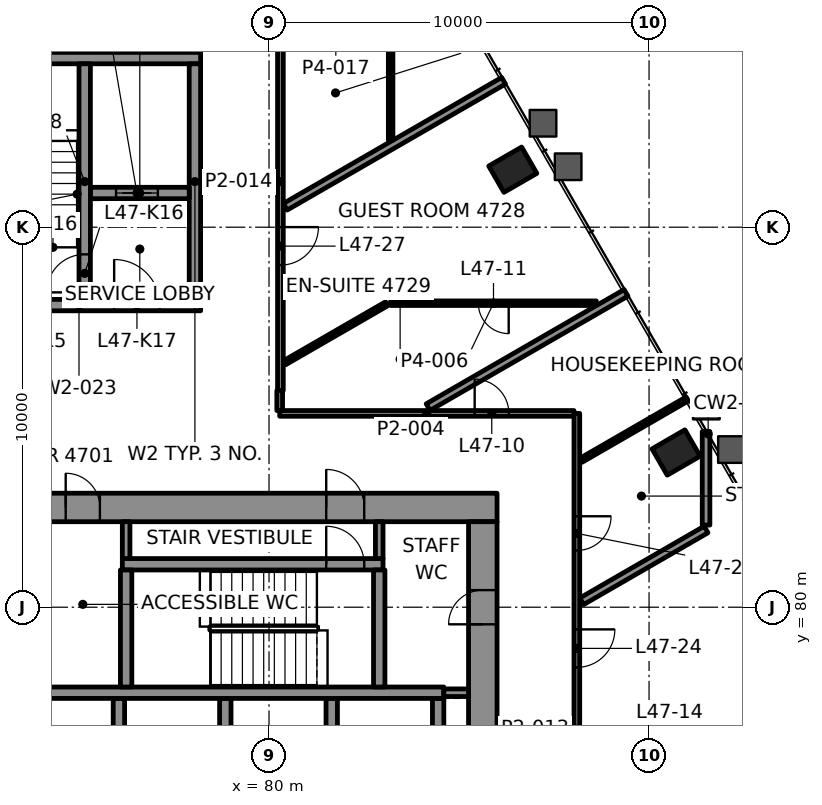
"""IFC4 building model, lengths in metres.
Left out: names, types, materials, properties, quantities, classifications, styles, units other than length and angle.
Written with IfcOpenShell. Run it as: python <this file> out.ifc"""

import sys

from ifc_helpers import new_model, si_unit, direction, frame, frame_2d, origin, origin_2d, place, context, subcontext, project, spatial, rectangle, hollow_rectangle, extrude, element, fill, save


model = new_model("IFC4")
c1 = context("Model", 3, precision=1e-05, world=origin(), true_north=direction((0.0, 1.0)))
c2 = subcontext(c1, "Body", "Model", "MODEL_VIEW")
j1 = project(units=[si_unit("LENGTHUNIT", "METRE"), si_unit("PLANEANGLEUNIT", "RADIAN")], contexts=[c1])
p1 = place(None, origin())
s1 = spatial("IfcSite", under=j1, at=p1, CompositionType="ELEMENT")
p2 = place(p1, origin())
s2 = spatial("IfcBuilding", under=s1, at=p2, CompositionType="ELEMENT")
p3 = place(p2, frame((0.0, 0.0, 202.6)))
s3 = spatial("IfcBuildingStorey", under=s2, at=p3, CompositionType="ELEMENT", Elevation=202.6)
for number, where, z_axis, x_axis in (
    (1, (90.711, 84.071, -0.0), (0.0, 0.0, 1.0), (-0.5, 0.866, 0.0)),
    (2, (86.414, 91.513, -0.0), (0.0, 0.0, 1.0), (-0.5, 0.866, 0.0)),
):
    element("IfcColumn", number, at=place(p3, frame(where, z_axis=z_axis, x_axis=x_axis)), inside=s3, PredefinedType="COLUMN", context=c2, shape_type="SweptSolid", body=[
        extrude(hollow_rectangle(XDim=0.8, YDim=1.0, WallThickness=0.05, at=origin_2d()), origin(), (0.0, 0.0, 1.0), 3.9),
    ])
p4 = place(p3, frame((64.0, 82.625, 0.0), z_axis=(0.0, 0.0, 1.0), x_axis=(1.0, 0.0, 0.0)))
e3 = element("IfcWall", 3, at=p4, inside=s3, PredefinedType="SHEAR", context=c2, shape_type="SweptSolid", body=[
    extrude(rectangle(XDim=22.0, YDim=0.75, at=frame_2d((11.0, 0.0))), origin(), (0.0, 0.0, 1.0), 3.7),
])
p5 = place(p4, frame((3.695, 0.0, 0.0)))
e4 = element("IfcOpeningElement", 4, at=p5, cuts=e3, PredefinedType="OPENING", context=c2, shape_type="SweptSolid", body=[
    extrude(rectangle(XDim=1.0, YDim=2.1, at=frame_2d((0.5, 1.05))), frame((0.0, 0.385, 0.0), z_axis=(0.0, -1.0, 0.0), x_axis=(1.0, 0.0, 0.0)), (0.0, 0.0, 1.0), 0.77),
])
p6 = place(p4, frame((17.505, 0.0, 0.0)))
e5 = element("IfcOpeningElement", 5, at=p6, cuts=e3, PredefinedType="OPENING", context=c2, shape_type="SweptSolid", body=[
    extrude(rectangle(XDim=1.0, YDim=2.1, at=frame_2d((0.5, 1.05))), frame((0.0, 0.385, 0.0), z_axis=(0.0, -1.0, 0.0), x_axis=(1.0, 0.0, 0.0)), (0.0, 0.0, 1.0), 0.77),
])
p7 = place(p4, frame((10.65, 0.0, 0.0)))
e6 = element("IfcOpeningElement", 6, at=p7, cuts=e3, PredefinedType="OPENING", context=c2, shape_type="SweptSolid", body=[
    extrude(rectangle(XDim=0.9, YDim=2.1, at=frame_2d((0.45, 1.05))), frame((0.0, 0.385, 0.0), z_axis=(0.0, -1.0, 0.0), x_axis=(1.0, 0.0, 0.0)), (0.0, 0.0, 1.0), 0.77),
])
p8 = place(p3, frame((85.625, 67.75, 0.0), z_axis=(0.0, 0.0, 1.0), x_axis=(0.0, 1.0, 0.0)))
e7 = element("IfcWall", 7, at=p8, inside=s3, PredefinedType="SHEAR", context=c2, shape_type="SweptSolid", body=[
    extrude(rectangle(XDim=14.5, YDim=0.75, at=frame_2d((7.25, 0.0))), origin(), (0.0, 0.0, 1.0), 3.7),
])
p9 = place(p8, frame((4.65, 0.0, 0.0)))
e8 = element("IfcOpeningElement", 8, at=p9, cuts=e7, PredefinedType="OPENING", context=c2, shape_type="SweptSolid", body=[
    extrude(rectangle(XDim=1.8, YDim=2.1, at=frame_2d((0.9, 1.05))), frame((0.0, 0.385, 0.0), z_axis=(0.0, -1.0, 0.0), x_axis=(1.0, 0.0, 0.0)), (0.0, 0.0, 1.0), 0.77),
])
p10 = place(p8, frame((11.8, 0.0, 0.0)))
e9 = element("IfcOpeningElement", 9, at=p10, cuts=e7, PredefinedType="OPENING", context=c2, shape_type="SweptSolid", body=[
    extrude(rectangle(XDim=0.9, YDim=2.1, at=frame_2d((0.45, 1.05))), frame((0.0, 0.385, 0.0), z_axis=(0.0, -1.0, 0.0), x_axis=(1.0, 0.0, 0.0)), (0.0, 0.0, 1.0), 0.77),
])
for number, where, z_axis, x_axis in (
    (10, (76.05, 75.0, 0.0), (0.0, 0.0, 1.0), (0.0, 1.0, 0.0)),
    (11, (78.85, 75.0, 0.0), (0.0, 0.0, 1.0), (0.0, 1.0, 0.0)),
    (12, (81.65, 75.0, 0.0), (0.0, 0.0, 1.0), (0.0, 1.0, 0.0)),
    (13, (84.45, 75.0, 0.0), (0.0, 0.0, 1.0), (0.0, 1.0, 0.0)),
):
    element("IfcWall", number, at=place(p3, frame(where, z_axis=z_axis, x_axis=x_axis)), inside=s3, PredefinedType="SHEAR", context=c2, shape_type="SweptSolid", body=[
        extrude(rectangle(XDim=2.6, YDim=0.3, at=frame_2d((1.3, 0.0))), origin(), (0.0, 0.0, 1.0), 3.7),
    ])
p11 = place(p3, frame((67.15, 77.75, 0.0), z_axis=(0.0, 0.0, 1.0), x_axis=(1.0, 0.0, 0.0)))
e14 = element("IfcWall", 14, at=p11, inside=s3, PredefinedType="SHEAR", context=c2, shape_type="SweptSolid", body=[
    extrude(rectangle(XDim=17.45, YDim=0.3, at=frame_2d((8.725, 0.0))), origin(), (0.0, 0.0, 1.0), 3.7),
])
p12 = place(p11, frame((0.545, 0.0, 0.0)))
e15 = element("IfcOpeningElement", 15, at=p12, cuts=e14, PredefinedType="OPENING", context=c2, shape_type="SweptSolid", body=[
    extrude(rectangle(XDim=1.0, YDim=2.1, at=frame_2d((0.5, 1.05))), frame((0.0, 0.16, 0.0), z_axis=(0.0, -1.0, 0.0), x_axis=(1.0, 0.0, 0.0)), (0.0, 0.0, 1.0), 0.32),
])
p13 = place(p3, frame((76.14, 81.13, 0.0), z_axis=(0.0, 0.0, 1.0), x_axis=(1.0, 0.0, 0.0)))
e16 = element("IfcWall", 16, at=p13, inside=s3, PredefinedType="SHEAR", context=c2, shape_type="SweptSolid", body=[
    extrude(rectangle(XDim=6.86, YDim=0.3, at=frame_2d((3.43, 0.0))), origin(), (0.0, 0.0, 1.0), 3.7),
])
p14 = place(p13, frame((5.365, 0.0, 0.0)))
e17 = element("IfcOpeningElement", 17, at=p14, cuts=e16, PredefinedType="OPENING", context=c2, shape_type="SweptSolid", body=[
    extrude(rectangle(XDim=1.0, YDim=2.1, at=frame_2d((0.5, 1.05))), frame((0.0, 0.16, 0.0), z_axis=(0.0, -1.0, 0.0), x_axis=(1.0, 0.0, 0.0)), (0.0, 0.0, 1.0), 0.32),
])
for number, where, z_axis, x_axis in (
    (18, (76.24, 77.9, 0.0), (0.0, 0.0, 1.0), (0.0, 1.0, 0.0)),
    (19, (82.9, 77.9, 0.0), (0.0, 0.0, 1.0), (0.0, 1.0, 0.0)),
):
    element("IfcWall", number, at=place(p3, frame(where, z_axis=z_axis, x_axis=x_axis)), inside=s3, PredefinedType="SHEAR", context=c2, shape_type="SweptSolid", body=[
        extrude(rectangle(XDim=3.08, YDim=0.3, at=frame_2d((1.54, 0.0))), origin(), (0.0, 0.0, 1.0), 3.7),
    ])
p15 = place(p3, frame((71.8, 87.95, 0.0), z_axis=(0.0, 0.0, 1.0), x_axis=(1.0, 0.0, 0.0)))
e20 = element("IfcWall", 20, at=p15, inside=s3, PredefinedType="SHEAR", context=c2, shape_type="SweptSolid", body=[
    extrude(rectangle(XDim=6.4, YDim=0.3, at=frame_2d((3.2, 0.0))), origin(), (0.0, 0.0, 1.0), 3.7),
])
p16 = place(p15, frame((1.325, 0.0, 0.0)))
e21 = element("IfcOpeningElement", 21, at=p16, cuts=e20, PredefinedType="OPENING", context=c2, shape_type="SweptSolid", body=[
    extrude(rectangle(XDim=1.0, YDim=2.1, at=frame_2d((0.5, 1.05))), frame((0.0, 0.16, 0.0), z_axis=(0.0, -1.0, 0.0), x_axis=(1.0, 0.0, 0.0)), (0.0, 0.0, 1.0), 0.32),
])
p17 = place(p15, frame((4.125, 0.0, 0.0)))
e22 = element("IfcOpeningElement", 22, at=p17, cuts=e20, PredefinedType="OPENING", context=c2, shape_type="SweptSolid", body=[
    extrude(rectangle(XDim=1.2, YDim=2.1, at=frame_2d((0.6, 1.05))), frame((0.0, 0.16, 0.0), z_axis=(0.0, -1.0, 0.0), x_axis=(1.0, 0.0, 0.0)), (0.0, 0.0, 1.0), 0.32),
])
p18 = place(p3, frame((71.8, 94.45, 0.0), z_axis=(0.0, 0.0, 1.0), x_axis=(1.0, 0.0, 0.0)))
e23 = element("IfcWall", 23, at=p18, inside=s3, PredefinedType="SHEAR", context=c2, shape_type="SweptSolid", body=[
    extrude(rectangle(XDim=6.4, YDim=0.3, at=frame_2d((3.2, 0.0))), origin(), (0.0, 0.0, 1.0), 3.7),
])
p19 = place(p3, frame((78.05, 88.1, 0.0), z_axis=(0.0, 0.0, 1.0), x_axis=(0.0, 1.0, 0.0)))
e24 = element("IfcWall", 24, at=p19, inside=s3, PredefinedType="SHEAR", context=c2, shape_type="SweptSolid", body=[
    extrude(rectangle(XDim=6.2, YDim=0.3, at=frame_2d((3.1, 0.0))), origin(), (0.0, 0.0, 1.0), 3.7),
])
p20 = place(p3, frame((75.3, 90.9, 0.0), z_axis=(0.0, 0.0, 1.0), x_axis=(1.0, 0.0, 0.0)))
e25 = element("IfcWall", 25, at=p20, inside=s3, PredefinedType="SHEAR", context=c2, shape_type="SweptSolid", body=[
    extrude(rectangle(XDim=2.6, YDim=0.3, at=frame_2d((1.3, 0.0))), origin(), (0.0, 0.0, 1.0), 3.7),
])
p21 = place(p20, frame((0.675, 0.0, 0.0)))
e26 = element("IfcOpeningElement", 26, at=p21, cuts=e25, PredefinedType="OPENING", context=c2, shape_type="SweptSolid", body=[
    extrude(rectangle(XDim=1.1, YDim=2.1, at=frame_2d((0.55, 1.05))), frame((0.0, 0.16, 0.0), z_axis=(0.0, -1.0, 0.0), x_axis=(1.0, 0.0, 0.0)), (0.0, 0.0, 1.0), 0.32),
])
p22 = place(p3, frame((75.15, 88.1, 0.0), z_axis=(0.0, 0.0, 1.0), x_axis=(0.0, 1.0, 0.0)))
e27 = element("IfcWall", 27, at=p22, inside=s3, PredefinedType="SHEAR", context=c2, shape_type="SweptSolid", body=[
    extrude(rectangle(XDim=6.2, YDim=0.3, at=frame_2d((3.1, 0.0))), origin(), (0.0, 0.0, 1.0), 3.7),
])
p23 = place(p22, frame((0.185, 0.0, 0.0)))
e28 = element("IfcOpeningElement", 28, at=p23, cuts=e27, PredefinedType="OPENING", context=c2, shape_type="SweptSolid", body=[
    extrude(rectangle(XDim=1.0, YDim=2.1, at=frame_2d((0.5, 1.05))), frame((0.0, 0.16, 0.0), z_axis=(0.0, -1.0, 0.0), x_axis=(1.0, 0.0, 0.0)), (0.0, 0.0, 1.0), 0.32),
])
p24 = place(p3, frame((80.281, 85.1, 0.0), z_axis=(0.0, 0.0, 1.0), x_axis=(1.0, 0.0, 0.0)))
e29 = element("IfcWall", 29, at=p24, inside=s3, PredefinedType="PARTITIONING", context=c2, shape_type="SweptSolid", body=[
    extrude(rectangle(XDim=7.744, YDim=0.15, at=frame_2d((3.872, 0.0))), origin(), (0.0, 0.0, 1.0), 3.1),
])
p25 = place(p24, frame((5.13, 0.0, 0.0)))
e30 = element("IfcOpeningElement", 30, at=p25, cuts=e29, PredefinedType="OPENING", context=c2, shape_type="SweptSolid", body=[
    extrude(rectangle(XDim=0.9, YDim=2.1, at=frame_2d((0.45, 1.05))), frame((0.0, 0.085, 0.0), z_axis=(0.0, -1.0, 0.0), x_axis=(1.0, 0.0, 0.0)), (0.0, 0.0, 1.0), 0.17),
])
p26 = place(p3, frame((88.613, 88.0, 0.0), z_axis=(0.0, 0.0, 1.0), x_axis=(-1.0, 0.0, 0.0)))
e31 = element("IfcWall", 31, at=p26, inside=s3, PredefinedType="PARTITIONING", context=c2, shape_type="SweptSolid", body=[
    extrude(rectangle(XDim=5.412, YDim=0.12, at=frame_2d((2.706, 0.0))), origin(), (0.0, 0.0, 1.0), 3.022),
])
p27 = place(p26, frame((2.306, 0.0, 0.0)))
e32 = element("IfcOpeningElement", 32, at=p27, cuts=e31, PredefinedType="OPENING", context=c2, shape_type="SweptSolid", body=[
    extrude(rectangle(XDim=0.8, YDim=2.1, at=frame_2d((0.4, 1.05))), frame((0.0, 0.07, 0.0), z_axis=(0.0, -1.0, 0.0), x_axis=(1.0, 0.0, 0.0)), (0.0, 0.0, 1.0), 0.14),
])
p28 = place(p3, frame((88.227, 80.155, 0.0), z_axis=(0.0, 0.0, 1.0), x_axis=(0.86599624775, 0.500050496333, 0.0)))
e33 = element("IfcWall", 33, at=p28, inside=s3, PredefinedType="PARTITIONING", context=c2, shape_type="SweptSolid", body=[
    extrude(rectangle(XDim=3.779, YDim=0.2, at=frame_2d((1.89, 0.0))), origin(), (0.0, 0.0, 1.0), 3.1),
])
p29 = place(p3, frame((88.21, 83.867, 0.0), z_axis=(0.0, 0.0, 1.0), x_axis=(0.86605210011, 0.499953757757, 0.0)))
e34 = element("IfcWall", 34, at=p29, inside=s3, PredefinedType="PARTITIONING", context=c2, shape_type="SweptSolid", body=[
    extrude(rectangle(XDim=3.228, YDim=0.12, at=frame_2d((1.614, 0.0))), origin(), (0.0, 0.0, 1.0), 3.022),
])
p30 = place(p3, frame((84.186, 85.265, 0.0), z_axis=(0.0, 0.0, 1.0), x_axis=(0.866028754818, 0.499994195795, 0.0)))
e35 = element("IfcWall", 35, at=p30, inside=s3, PredefinedType="PARTITIONING", context=c2, shape_type="SweptSolid", body=[
    extrude(rectangle(XDim=6.014, YDim=0.2, at=frame_2d((3.007, 0.0))), origin(), (0.0, 0.0, 1.0), 3.022),
])
p31 = place(p3, frame((80.41, 86.434, 0.0), z_axis=(0.0, 0.0, 1.0), x_axis=(0.866030936828, 0.499990416364, 0.0)))
e36 = element("IfcWall", 36, at=p31, inside=s3, PredefinedType="PARTITIONING", context=c2, shape_type="SweptSolid", body=[
    extrude(rectangle(XDim=3.102, YDim=0.12, at=frame_2d((1.551, 0.0))), origin(), (0.0, 0.0, 1.0), 3.1),
])
p32 = place(p3, frame((80.427, 90.537, 0.0), z_axis=(0.0, 0.0, 1.0), x_axis=(0.866026229868, 0.499998569178, 0.0)))
e37 = element("IfcWall", 37, at=p32, inside=s3, PredefinedType="PARTITIONING", context=c2, shape_type="SweptSolid", body=[
    extrude(rectangle(XDim=6.633, YDim=0.2, at=frame_2d((3.317, 0.0))), origin(), (0.0, 0.0, 1.0), 3.022),
])
p33 = place(p3, frame((91.5, 82.161, 0.0), z_axis=(0.0, 0.0, 1.0), x_axis=(0.0, 1.0, 0.0)))
e38 = element("IfcWall", 38, at=p33, inside=s3, PredefinedType="PARTITIONING", context=c2, shape_type="SweptSolid", body=[
    extrude(rectangle(XDim=2.464, YDim=0.2, at=frame_2d((1.232, 0.0))), origin(), (0.0, 0.0, 1.0), 3.022),
])
p34 = place(p3, frame((88.1, 85.1, 0.0), z_axis=(0.0, 0.0, 1.0), x_axis=(0.0, -1.0, 0.0)))
e39 = element("IfcWall", 39, at=p34, inside=s3, PredefinedType="PARTITIONING", context=c2, shape_type="SweptSolid", body=[
    extrude(rectangle(XDim=16.624, YDim=0.15, at=frame_2d((8.312, 0.0))), origin(), (0.0, 0.0, 1.0), 3.1),
])
p35 = place(p34, frame((2.707, 0.0, 0.0)))
e40 = element("IfcOpeningElement", 40, at=p35, cuts=e39, PredefinedType="OPENING", context=c2, shape_type="SweptSolid", body=[
    extrude(rectangle(XDim=0.9, YDim=2.1, at=frame_2d((0.45, 1.05))), frame((0.0, 0.085, 0.0), z_axis=(0.0, -1.0, 0.0), x_axis=(1.0, 0.0, 0.0)), (0.0, 0.0, 1.0), 0.17),
])
p36 = place(p34, frame((5.684, 0.0, 0.0)))
e41 = element("IfcOpeningElement", 41, at=p36, cuts=e39, PredefinedType="OPENING", context=c2, shape_type="SweptSolid", body=[
    extrude(rectangle(XDim=1.0, YDim=2.1, at=frame_2d((0.5, 1.05))), frame((0.0, 0.085, 0.0), z_axis=(0.0, -1.0, 0.0), x_axis=(1.0, 0.0, 0.0)), (0.0, 0.0, 1.0), 0.17),
])
p37 = place(p34, frame((15.01, 0.0, 0.0)))
e42 = element("IfcOpeningElement", 42, at=p37, cuts=e39, PredefinedType="OPENING", context=c2, shape_type="SweptSolid", body=[
    extrude(rectangle(XDim=1.0, YDim=2.1, at=frame_2d((0.5, 1.05))), frame((0.0, 0.085, 0.0), z_axis=(0.0, -1.0, 0.0), x_axis=(1.0, 0.0, 0.0)), (0.0, 0.0, 1.0), 0.17),
])
p38 = place(p3, frame((83.2, 92.294, 0.0), z_axis=(0.0, 0.0, 1.0), x_axis=(0.0, 1.0, 0.0)))
e43 = element("IfcWall", 43, at=p38, inside=s3, PredefinedType="PARTITIONING", context=c2, shape_type="SweptSolid", body=[
    extrude(rectangle(XDim=4.31, YDim=0.12, at=frame_2d((2.155, 0.0))), origin(), (0.0, 0.0, 1.0), 3.1),
])
p39 = place(p3, frame((80.3, 96.699, 0.0), z_axis=(0.0, 0.0, 1.0), x_axis=(0.0, -1.0, 0.0)))
e44 = element("IfcWall", 44, at=p39, inside=s3, PredefinedType="PARTITIONING", context=c2, shape_type="SweptSolid", body=[
    extrude(rectangle(XDim=10.999, YDim=0.15, at=frame_2d((5.5, 0.0))), origin(), (0.0, 0.0, 1.0), 3.097),
])
p40 = place(p39, frame((6.697, 0.0, 0.0)))
e45 = element("IfcOpeningElement", 45, at=p40, cuts=e44, PredefinedType="OPENING", context=c2, shape_type="SweptSolid", body=[
    extrude(rectangle(XDim=1.0, YDim=2.1, at=frame_2d((0.5, 1.05))), frame((0.0, 0.085, 0.0), z_axis=(0.0, -1.0, 0.0), x_axis=(1.0, 0.0, 0.0)), (0.0, 0.0, 1.0), 0.17),
])
p41 = place(p3, frame((80.281, 85.175, 0.0), z_axis=(0.0, 0.0, 1.0), x_axis=(0.0, 1.0, 0.0)))
e46 = element("IfcWall", 46, at=p41, inside=s3, PredefinedType="PARTITIONING", context=c2, shape_type="SweptSolid", body=[
    extrude(rectangle(XDim=0.525, YDim=0.15, at=frame_2d((0.262, 0.0))), origin(), (0.0, 0.0, 1.0), 3.1),
])
p42 = place(p3, frame((84.6, 77.75, 0.0), z_axis=(0.0, 0.0, 1.0), x_axis=(1.0, 0.0, 0.0)))
e47 = element("IfcWall", 47, at=p42, inside=s3, PredefinedType="PARTITIONING", context=c2, shape_type="SweptSolid", body=[
    extrude(rectangle(XDim=0.65, YDim=0.2, at=frame_2d((0.325, 0.0))), origin(), (0.0, 0.0, 1.0), 3.7),
])
for number, where, z_axis, x_axis in (
    (48, (76.24, 81.28, 0.0), (0.0, 0.0, 1.0), (0.0, 1.0, 0.0)),
    (49, (82.9, 81.28, 0.0), (0.0, 0.0, 1.0), (0.0, 1.0, 0.0)),
):
    element("IfcWall", number, at=place(p3, frame(where, z_axis=z_axis, x_axis=x_axis)), inside=s3, PredefinedType="PARTITIONING", context=c2, shape_type="SweptSolid", body=[
        extrude(rectangle(XDim=0.97, YDim=0.2, at=frame_2d((0.485, 0.0))), origin(), (0.0, 0.0, 1.0), 3.7),
    ])
p43 = place(p25, origin())
e50 = element("IfcDoor", 50, at=p43, inside=s3, OperationType="SINGLE_SWING_RIGHT", PredefinedType="DOOR", context=c2, shape_type="SweptSolid", body=[
    extrude(rectangle(XDim=0.9, YDim=2.1, at=frame_2d((0.45, 1.05))), frame((0.0, 0.025, 0.0), z_axis=(0.0, -1.0, 0.0), x_axis=(1.0, 0.0, 0.0)), (0.0, 0.0, 1.0), 0.05),
])
fill(e30, e50)
p44 = place(p27, origin())
e51 = element("IfcDoor", 51, at=p44, inside=s3, OperationType="SINGLE_SWING_LEFT", PredefinedType="DOOR", context=c2, shape_type="SweptSolid", body=[
    extrude(rectangle(XDim=0.8, YDim=2.1, at=frame_2d((0.4, 1.05))), frame((0.0, 0.025, 0.0), z_axis=(0.0, -1.0, 0.0), x_axis=(1.0, 0.0, 0.0)), (0.0, 0.0, 1.0), 0.05),
])
fill(e32, e51)
p45 = place(p35, origin())
e52 = element("IfcDoor", 52, at=p45, inside=s3, OperationType="SINGLE_SWING_RIGHT", PredefinedType="DOOR", context=c2, shape_type="SweptSolid", body=[
    extrude(rectangle(XDim=0.9, YDim=2.1, at=frame_2d((0.45, 1.05))), frame((0.0, 0.025, 0.0), z_axis=(0.0, -1.0, 0.0), x_axis=(1.0, 0.0, 0.0)), (0.0, 0.0, 1.0), 0.05),
])
fill(e40, e52)
p46 = place(p36, origin())
e53 = element("IfcDoor", 53, at=p46, inside=s3, OperationType="SINGLE_SWING_RIGHT", PredefinedType="DOOR", context=c2, shape_type="SweptSolid", body=[
    extrude(rectangle(XDim=1.0, YDim=2.1, at=frame_2d((0.5, 1.05))), frame((0.0, 0.025, 0.0), z_axis=(0.0, -1.0, 0.0), x_axis=(1.0, 0.0, 0.0)), (0.0, 0.0, 1.0), 0.05),
])
fill(e41, e53)
p47 = place(p40, origin())
e54 = element("IfcDoor", 54, at=p47, inside=s3, OperationType="SINGLE_SWING_RIGHT", PredefinedType="DOOR", context=c2, shape_type="SweptSolid", body=[
    extrude(rectangle(XDim=1.0, YDim=2.1, at=frame_2d((0.5, 1.05))), frame((0.0, 0.025, 0.0), z_axis=(0.0, -1.0, 0.0), x_axis=(1.0, 0.0, 0.0)), (0.0, 0.0, 1.0), 0.05),
])
fill(e45, e54)
p48 = place(p3, origin())
p49 = place(p48, frame((85.797, 94.533, 0.15), z_axis=(0.0, 0.0, 1.0), x_axis=(-0.5, 0.866025, 0.0)))
p50 = place(p49, origin())
e55 = element("IfcWindow", 55, at=p50, inside=s3, PartitioningType="SINGLE_PANEL", PredefinedType="WINDOW", context=c2, shape_type="SweptSolid", body=[
    extrude(rectangle(XDim=2.789, YDim=3.55, at=frame_2d((1.395, 1.775))), frame((0.0, 0.03, 0.0), z_axis=(0.0, -1.0, 0.0), x_axis=(1.0, 0.0, 0.0)), (0.0, 0.0, 1.0), 0.06),
])
p51 = place(p21, origin())
e56 = element("IfcDoor", 56, at=p51, inside=s3, OperationType="DOUBLE_DOOR_SLIDING", PredefinedType="DOOR", context=c2, shape_type="SweptSolid", body=[
    extrude(rectangle(XDim=1.1, YDim=2.1, at=frame_2d((0.55, 1.05))), frame((0.0, 0.025, 0.0), z_axis=(0.0, -1.0, 0.0), x_axis=(1.0, 0.0, 0.0)), (0.0, 0.0, 1.0), 0.05),
])
fill(e26, e56)
p52 = place(p14, origin())
e57 = element("IfcDoor", 57, at=p52, inside=s3, OperationType="SINGLE_SWING_RIGHT", PredefinedType="DOOR", context=c2, shape_type="SweptSolid", body=[
    extrude(rectangle(XDim=1.0, YDim=2.1, at=frame_2d((0.5, 1.05))), frame((0.0, 0.025, 0.0), z_axis=(0.0, -1.0, 0.0), x_axis=(1.0, 0.0, 0.0)), (0.0, 0.0, 1.0), 0.05),
])
fill(e17, e57)
p53 = place(p6, origin())
e58 = element("IfcDoor", 58, at=p53, inside=s3, OperationType="SINGLE_SWING_LEFT", PredefinedType="DOOR", context=c2, shape_type="SweptSolid", body=[
    extrude(rectangle(XDim=1.0, YDim=2.1, at=frame_2d((0.5, 1.05))), frame((0.0, 0.095, 0.0), z_axis=(0.0, -1.0, 0.0), x_axis=(1.0, 0.0, 0.0)), (0.0, 0.0, 1.0), 0.19),
])
fill(e5, e58)
p54 = place(p23, origin())
e59 = element("IfcDoor", 59, at=p54, inside=s3, OperationType="SINGLE_SWING_LEFT", PredefinedType="DOOR", context=c2, shape_type="SweptSolid", body=[
    extrude(rectangle(XDim=1.0, YDim=2.1, at=frame_2d((0.5, 1.05))), frame((0.0, 0.025, 0.0), z_axis=(0.0, -1.0, 0.0), x_axis=(1.0, 0.0, 0.0)), (0.0, 0.0, 1.0), 0.05),
])
fill(e28, e59)
p55 = place(p17, origin())
e60 = element("IfcDoor", 60, at=p55, inside=s3, OperationType="SINGLE_SWING_RIGHT", PredefinedType="DOOR", context=c2, shape_type="SweptSolid", body=[
    extrude(rectangle(XDim=1.2, YDim=2.1, at=frame_2d((0.6, 1.05))), frame((0.0, 0.025, 0.0), z_axis=(0.0, -1.0, 0.0), x_axis=(1.0, 0.0, 0.0)), (0.0, 0.0, 1.0), 0.05),
])
fill(e22, e60)
p56 = place(p7, origin())
e61 = element("IfcDoor", 61, at=p56, inside=s3, OperationType="SINGLE_SWING_RIGHT", PredefinedType="DOOR", context=c2, shape_type="SweptSolid", body=[
    extrude(rectangle(XDim=0.9, YDim=2.1, at=frame_2d((0.45, 1.05))), frame((0.0, 0.095, 0.0), z_axis=(0.0, -1.0, 0.0), x_axis=(1.0, 0.0, 0.0)), (0.0, 0.0, 1.0), 0.19),
])
fill(e6, e61)
p57 = place(p10, origin())
e62 = element("IfcDoor", 62, at=p57, inside=s3, OperationType="SINGLE_SWING_LEFT", PredefinedType="DOOR", context=c2, shape_type="SweptSolid", body=[
    extrude(rectangle(XDim=0.9, YDim=2.1, at=frame_2d((0.45, 1.05))), frame((0.0, 0.095, 0.0), z_axis=(0.0, -1.0, 0.0), x_axis=(1.0, 0.0, 0.0)), (0.0, 0.0, 1.0), 0.19),
])
fill(e9, e62)
save(model, sys.argv[1])
